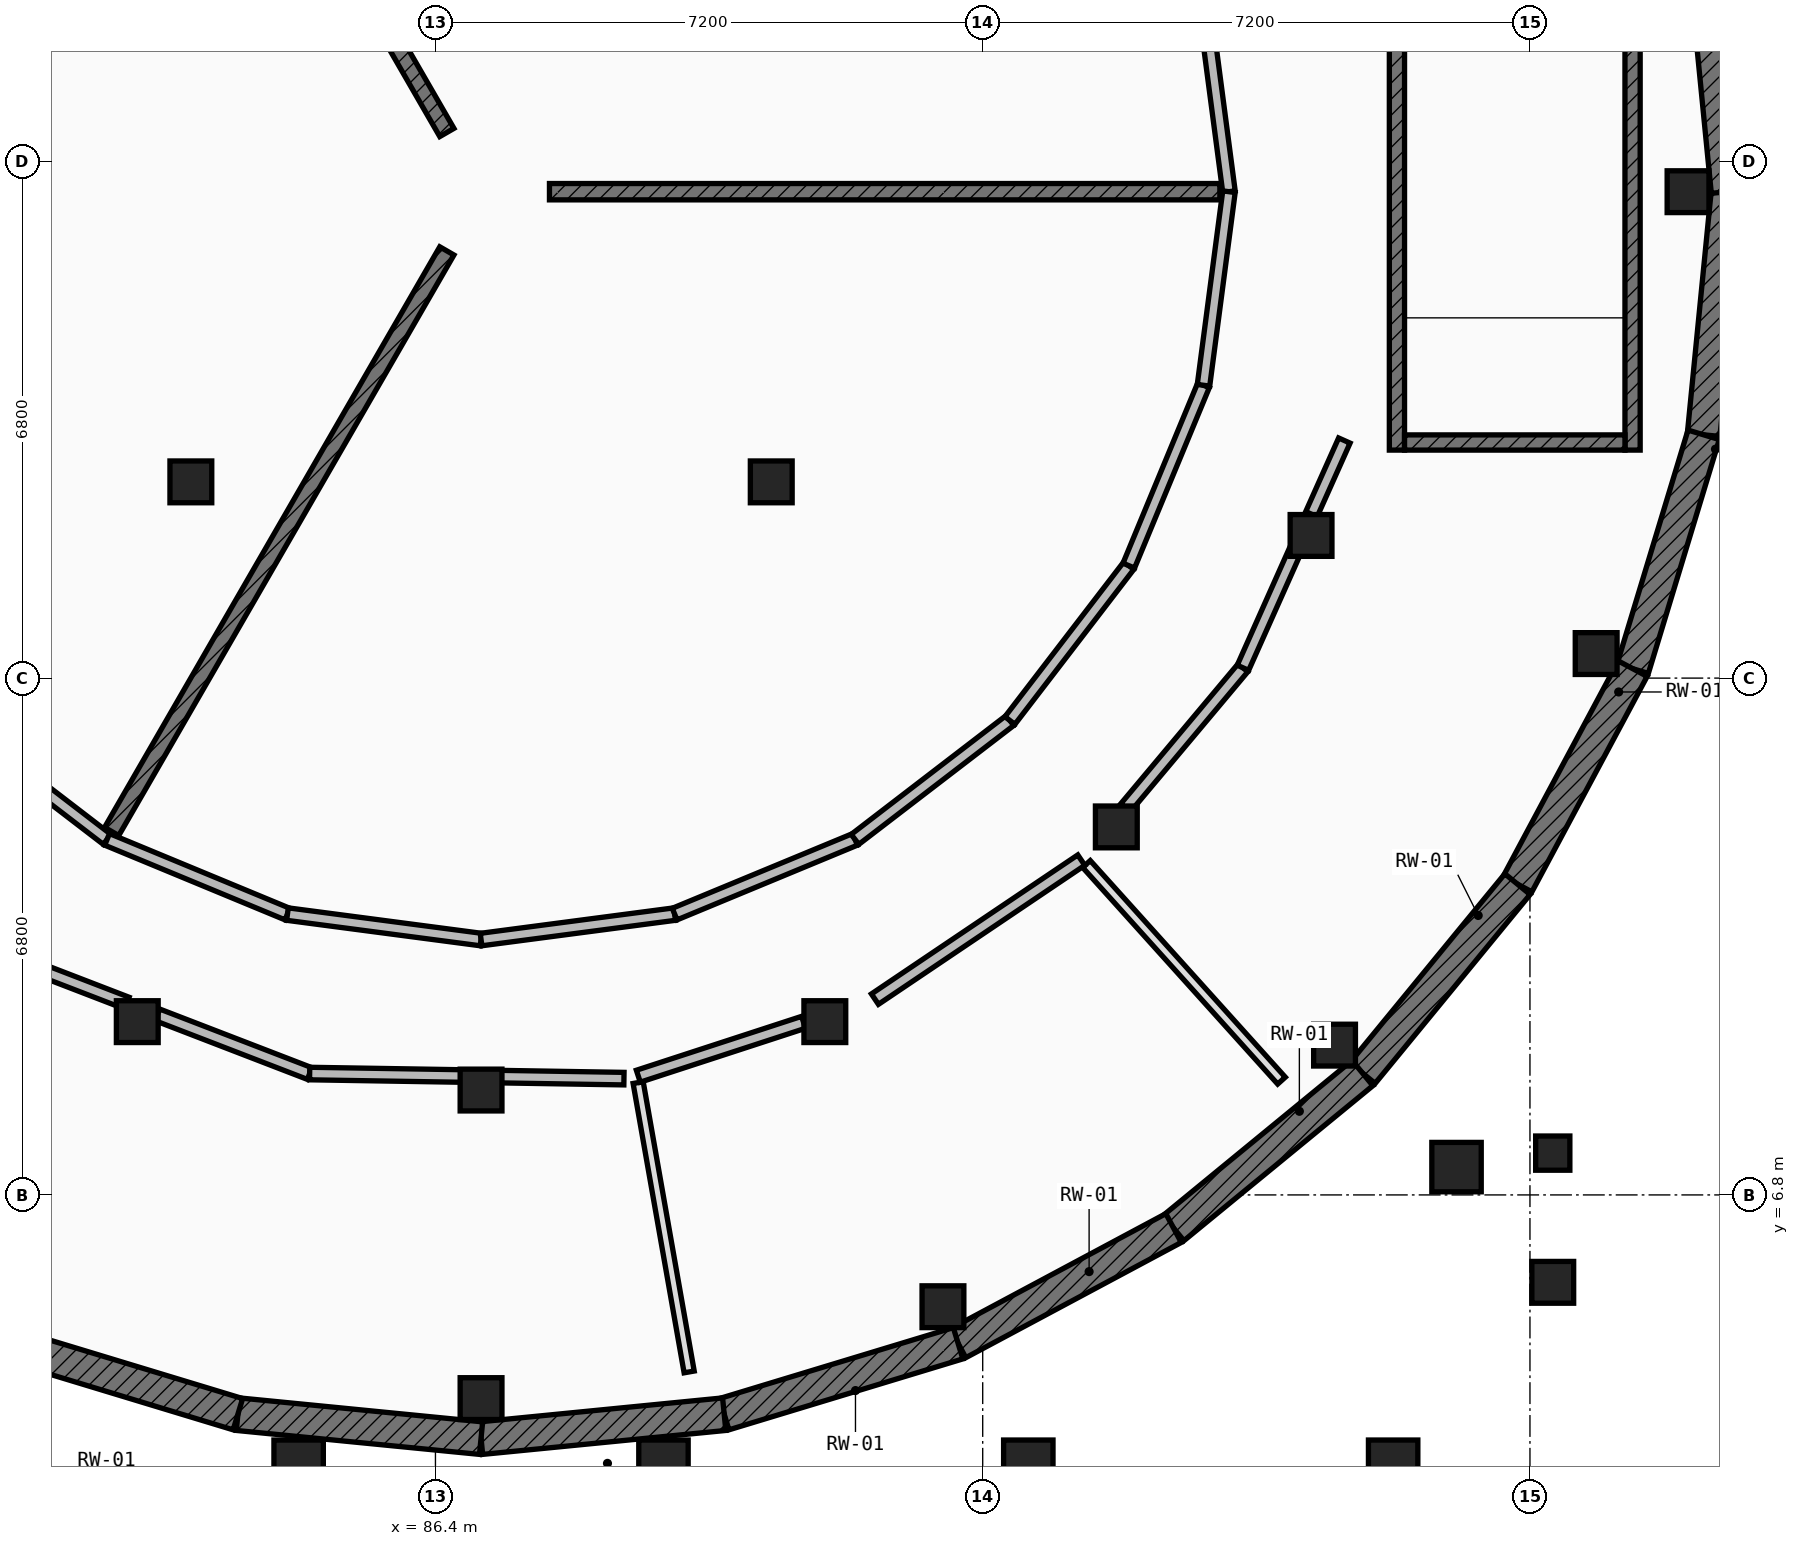
"""IFC4 building model, lengths in metres.
Left out: names, types, materials, properties, quantities, classifications, styles, units other than length and angle.
Written with IfcOpenShell. Run it as: python <this file> out.ifc"""

import sys

from ifc_helpers import new_model, si_unit, direction, frame, frame_2d, origin, origin_2d, place, context, subcontext, project, spatial, rectangle, extrude, element, fill, save


model = new_model("IFC4")
c1 = context("Model", 3, precision=1e-05, world=origin(), true_north=direction((0.0, 1.0)))
c2 = subcontext(c1, "Body", "Model", "MODEL_VIEW")
j1 = project(units=[si_unit("LENGTHUNIT", "METRE"), si_unit("PLANEANGLEUNIT", "RADIAN")], contexts=[c1])
p1 = place(None, origin())
s1 = spatial("IfcSite", under=j1, at=p1, CompositionType="ELEMENT")
p2 = place(p1, origin())
s2 = spatial("IfcBuilding", under=s1, at=p2, CompositionType="ELEMENT")
p3 = place(p2, frame((0.0, 0.0, -4.55)))
s3 = spatial("IfcBuildingStorey", under=s2, at=p3, CompositionType="ELEMENT", Elevation=-4.55)
for number, where, z_axis, x_axis in (
    (1, (102.88, 20.0, 0.0), (0.0, 0.0, 1.0), (1.0, 0.0, 0.0)),
    (2, (87.0, 4.12, 0.0), (0.0, 0.0, 1.0), (1.0, 0.0, 0.0)),
    (3, (93.077, 5.329, 0.0), (0.0, 0.0, 1.0), (1.0, 0.0, 0.0)),
    (4, (98.229, 8.771, 0.0), (0.0, 0.0, 1.0), (1.0, 0.0, 0.0)),
    (5, (101.671, 13.923, 0.0), (0.0, 0.0, 1.0), (1.0, 0.0, 0.0)),
    (6, (82.477, 9.08, 0.0), (0.0, 0.0, 1.0), (1.0, 0.0, 0.0)),
    (7, (87.0, 8.18, 0.0), (0.0, 0.0, 1.0), (1.0, 0.0, 0.0)),
    (8, (91.523, 9.08, 0.0), (0.0, 0.0, 1.0), (1.0, 0.0, 0.0)),
    (9, (95.358, 11.642, 0.0), (0.0, 0.0, 1.0), (1.0, 0.0, 0.0)),
    (10, (97.92, 15.477, 0.0), (0.0, 0.0, 1.0), (1.0, 0.0, 0.0)),
    (11, (83.182, 16.182, 0.0), (0.0, 0.0, 1.0), (1.0, 0.0, 0.0)),
    (12, (90.818, 16.182, 0.0), (0.0, 0.0, 1.0), (1.0, 0.0, 0.0)),
):
    element("IfcColumn", number, at=place(p3, frame(where, z_axis=z_axis, x_axis=x_axis)), inside=s3, PredefinedType="COLUMN", context=c2, shape_type="SweptSolid", body=[
        extrude(rectangle(XDim=0.55, YDim=0.55, at=origin_2d()), origin(), (0.0, 0.0, 1.0), 4.55),
    ])
for number, where, z_axis, x_axis in (
    (13, (84.6, 3.25, 0.0), (0.0, 0.0, 1.0), (1.0, 0.0, 0.0)),
    (14, (89.4, 3.25, 0.0), (0.0, 0.0, 1.0), (1.0, 0.0, 0.0)),
    (15, (94.2, 3.25, 0.0), (0.0, 0.0, 1.0), (1.0, 0.0, 0.0)),
    (16, (99.0, 3.25, 0.0), (0.0, 0.0, 1.0), (1.0, 0.0, 0.0)),
):
    element("IfcColumn", number, at=place(p3, frame(where, z_axis=z_axis, x_axis=x_axis)), inside=s3, PredefinedType="COLUMN", context=c2, shape_type="SweptSolid", body=[
        extrude(rectangle(XDim=0.65, YDim=0.65, at=origin_2d()), origin(), (0.0, 0.0, 1.0), 4.55),
    ])
p4 = place(p3, frame((101.1, 5.65, 0.0), z_axis=(0.0, 0.0, 1.0), x_axis=(1.0, 0.0, 0.0)))
e17 = element("IfcColumn", 17, at=p4, inside=s3, PredefinedType="COLUMN", context=c2, shape_type="SweptSolid", body=[
    extrude(rectangle(XDim=0.55, YDim=0.55, at=origin_2d()), origin(), (0.0, 0.0, 1.0), 4.55),
])
p5 = place(p3, frame((99.834, 7.166, 0.0), z_axis=(0.0, 0.0, 1.0), x_axis=(1.0, 0.0, 0.0)))
e18 = element("IfcColumn", 18, at=p5, inside=s3, PredefinedType="COLUMN", context=c2, shape_type="SweptSolid", body=[
    extrude(rectangle(XDim=0.65, YDim=0.65, at=origin_2d()), origin(), (0.0, 0.0, 1.0), 4.55),
])
p6 = place(p3, frame((101.1, 7.35, 0.0), z_axis=(0.0, 0.0, 1.0), x_axis=(1.0, 0.0, 0.0)))
e19 = element("IfcColumn", 19, at=p6, inside=s3, PredefinedType="COLUMN", context=c2, shape_type="SweptSolid", body=[
    extrude(rectangle(XDim=0.45, YDim=0.45, at=origin_2d()), origin(), (0.0, 0.0, 1.0), 4.55),
])
p7 = place(p3, frame((103.4, 20.0, 0.0), z_axis=(0.0, 0.0, 1.0), x_axis=(-0.097977057849, -0.995188673637, 0.0)))
e20 = element("IfcWall", 20, at=p7, inside=s3, PredefinedType="USERDEFINED", context=c2, shape_type="SweptSolid", body=[
    extrude(rectangle(XDim=3.214, YDim=0.43, at=frame_2d((1.607, 0.0))), origin(), (0.0, 0.0, 1.0), 3.335),
])
for number, where, z_axis, x_axis in (
    (21, (103.085, 16.801, 0.0), (0.0, 0.0, 1.0), (-0.29, -0.957, 0.0)),
    (22, (102.152, 13.724, 0.0), (0.0, 0.0, 1.0), (-0.472, -0.882, 0.0)),
    (23, (100.636, 10.889, 0.0), (0.0, 0.0, 1.0), (-0.634, -0.773, 0.0)),
    (24, (98.597, 8.403, 0.0), (0.0, 0.0, 1.0), (-0.773, -0.634, 0.0)),
    (25, (96.111, 6.364, 0.0), (0.0, 0.0, 1.0), (-0.882, -0.472, 0.0)),
    (26, (93.276, 4.848, 0.0), (0.0, 0.0, 1.0), (-0.957, -0.29, 0.0)),
):
    element("IfcWall", number, at=place(p3, frame(where, z_axis=z_axis, x_axis=x_axis)), inside=s3, PredefinedType="USERDEFINED", context=c2, shape_type="SweptSolid", body=[
        extrude(rectangle(XDim=3.215, YDim=0.43, at=frame_2d((1.607, 0.0))), origin(), (0.0, 0.0, 1.0), 3.335),
    ])
for number, where, z_axis, x_axis in (
    (27, (90.199, 3.915, 0.0), (0.0, 0.0, 1.0), (-0.995, -0.098, 0.0)),
    (28, (87.0, 3.6, 0.0), (0.0, 0.0, 1.0), (-0.995, 0.098, 0.0)),
):
    element("IfcWall", number, at=place(p3, frame(where, z_axis=z_axis, x_axis=x_axis)), inside=s3, PredefinedType="USERDEFINED", context=c2, shape_type="SweptSolid", body=[
        extrude(rectangle(XDim=3.214, YDim=0.43, at=frame_2d((1.607, 0.0))), origin(), (0.0, 0.0, 1.0), 3.335),
    ])
p8 = place(p3, frame((83.801, 3.915, 0.0), z_axis=(0.0, 0.0, 1.0), x_axis=(-0.956984161567, 0.29014016356, 0.0)))
e29 = element("IfcWall", 29, at=p8, inside=s3, PredefinedType="USERDEFINED", context=c2, shape_type="SweptSolid", body=[
    extrude(rectangle(XDim=3.215, YDim=0.43, at=frame_2d((1.607, 0.0))), origin(), (0.0, 0.0, 1.0), 3.335),
])
p9 = place(p3, frame((103.085, 23.199, 0.0), z_axis=(0.0, 0.0, 1.0), x_axis=(0.097977057849, -0.995188673637, 0.0)))
e30 = element("IfcWall", 30, at=p9, inside=s3, PredefinedType="USERDEFINED", context=c2, shape_type="SweptSolid", body=[
    extrude(rectangle(XDim=3.214, YDim=0.43, at=frame_2d((1.607, 0.0))), origin(), (0.0, 0.0, 1.0), 3.335),
])
p10 = place(p3, frame((99.05, 23.4, 0.0), z_axis=(0.0, 0.0, 1.0), x_axis=(0.0, -1.0, 0.0)))
e31 = element("IfcWall", 31, at=p10, inside=s3, PredefinedType="SHEAR", context=c2, shape_type="SweptSolid", body=[
    extrude(rectangle(XDim=6.8, YDim=0.2, at=frame_2d((3.4, 0.0))), origin(), (0.0, 0.0, 1.0), 4.135),
])
p11 = place(p10, frame((0.38, 0.0, 0.0)))
e32 = element("IfcOpeningElement", 32, at=p11, cuts=e31, PredefinedType="OPENING", context=c2, shape_type="SweptSolid", body=[
    extrude(rectangle(XDim=1.05, YDim=2.15, at=frame_2d((0.525, 1.075))), frame((0.0, 0.11, 0.0), z_axis=(0.0, -1.0, 0.0), x_axis=(1.0, 0.0, 0.0)), (0.0, 0.0, 1.0), 0.22),
])
p12 = place(p3, frame((102.15, 23.4, 0.0), z_axis=(0.0, 0.0, 1.0), x_axis=(0.0, -1.0, 0.0)))
e33 = element("IfcWall", 33, at=p12, inside=s3, PredefinedType="SHEAR", context=c2, shape_type="SweptSolid", body=[
    extrude(rectangle(XDim=6.8, YDim=0.2, at=frame_2d((3.4, 0.0))), origin(), (0.0, 0.0, 1.0), 4.135),
])
p13 = place(p3, frame((99.15, 16.7, 0.0), z_axis=(0.0, 0.0, 1.0), x_axis=(1.0, 0.0, 0.0)))
e34 = element("IfcWall", 34, at=p13, inside=s3, PredefinedType="SHEAR", context=c2, shape_type="SweptSolid", body=[
    extrude(rectangle(XDim=2.9, YDim=0.2, at=frame_2d((1.45, 0.0))), origin(), (0.0, 0.0, 1.0), 4.135),
])
p14 = place(p3, frame((87.9, 20.0, 0.0), z_axis=(0.0, 0.0, 1.0), x_axis=(1.0, 0.0, 0.0)))
e35 = element("IfcWall", 35, at=p14, inside=s3, PredefinedType="SOLIDWALL", context=c2, shape_type="SweptSolid", body=[
    extrude(rectangle(XDim=8.82, YDim=0.215, at=frame_2d((4.41, 0.0))), origin(), (0.0, 0.0, 1.0), 2.76),
])
for number, where, z_axis, x_axis in (
    (36, (86.55, 20.779, 0.0), (0.0, 0.0, 1.0), (-0.5, 0.866, 0.0)),
    (37, (86.55, 19.221, 0.0), (0.0, 0.0, 1.0), (-0.5, -0.866, 0.0)),
):
    element("IfcWall", number, at=place(p3, frame(where, z_axis=z_axis, x_axis=x_axis)), inside=s3, PredefinedType="SOLIDWALL", context=c2, shape_type="SweptSolid", body=[
        extrude(rectangle(XDim=8.821, YDim=0.215, at=frame_2d((4.41, 0.0))), origin(), (0.0, 0.0, 1.0), 2.76),
    ])
for number, where, z_axis, x_axis in (
    (38, (96.84, 20.0, 0.0), (0.0, 0.0, 1.0), (-0.13, 0.991, 0.0)),
    (39, (80.042, 13.042, 0.0), (0.0, 0.0, 1.0), (0.793, -0.609, 0.0)),
):
    element("IfcWall", number, at=place(p3, frame(where, z_axis=z_axis, x_axis=x_axis)), inside=s3, PredefinedType="PARTITIONING", context=c2, shape_type="SweptSolid", body=[
        extrude(rectangle(XDim=2.569, YDim=0.165, at=frame_2d((1.285, 0.0))), origin(), (0.0, 0.0, 1.0), 2.76),
    ])
p15 = place(p3, frame((82.08, 11.478, 0.0), z_axis=(0.0, 0.0, 1.0), x_axis=(0.923870848353, -0.382704397106, 0.0)))
e40 = element("IfcWall", 40, at=p15, inside=s3, PredefinedType="PARTITIONING", context=c2, shape_type="SweptSolid", body=[
    extrude(rectangle(XDim=2.568, YDim=0.165, at=frame_2d((1.284, 0.0))), origin(), (0.0, 0.0, 1.0), 2.76),
])
for number, where, z_axis, x_axis in (
    (41, (84.453, 10.495, 0.0), (0.0, 0.0, 1.0), (0.991, -0.13, 0.0)),
    (42, (87.0, 10.16, 0.0), (0.0, 0.0, 1.0), (0.991, 0.13, 0.0)),
):
    element("IfcWall", number, at=place(p3, frame(where, z_axis=z_axis, x_axis=x_axis)), inside=s3, PredefinedType="PARTITIONING", context=c2, shape_type="SweptSolid", body=[
        extrude(rectangle(XDim=2.569, YDim=0.165, at=frame_2d((1.285, 0.0))), origin(), (0.0, 0.0, 1.0), 2.76),
    ])
p16 = place(p3, frame((89.547, 10.495, 0.0), z_axis=(0.0, 0.0, 1.0), x_axis=(0.923870848353, 0.382704397106, 0.0)))
e43 = element("IfcWall", 43, at=p16, inside=s3, PredefinedType="PARTITIONING", context=c2, shape_type="SweptSolid", body=[
    extrude(rectangle(XDim=2.568, YDim=0.165, at=frame_2d((1.284, 0.0))), origin(), (0.0, 0.0, 1.0), 2.76),
])
p17 = place(p16, frame((0.624, 0.0, 0.0)))
e44 = element("IfcOpeningElement", 44, at=p17, cuts=e43, PredefinedType="OPENING", context=c2, shape_type="SweptSolid", body=[
    extrude(rectangle(XDim=1.32, YDim=2.24, at=frame_2d((0.66, 1.12))), frame((0.0, 0.093, 0.0), z_axis=(0.0, -1.0, 0.0), x_axis=(1.0, 0.0, 0.0)), (0.0, 0.0, 1.0), 0.185),
])
for number, where, z_axis, x_axis in (
    (45, (91.92, 11.478, 0.0), (0.0, 0.0, 1.0), (0.793, 0.609, 0.0)),
    (46, (93.958, 13.042, 0.0), (0.0, 0.0, 1.0), (0.609, 0.793, 0.0)),
):
    element("IfcWall", number, at=place(p3, frame(where, z_axis=z_axis, x_axis=x_axis)), inside=s3, PredefinedType="PARTITIONING", context=c2, shape_type="SweptSolid", body=[
        extrude(rectangle(XDim=2.569, YDim=0.165, at=frame_2d((1.285, 0.0))), origin(), (0.0, 0.0, 1.0), 2.76),
    ])
p18 = place(p3, frame((95.522, 15.08, 0.0), z_axis=(0.0, 0.0, 1.0), x_axis=(0.382704397106, 0.923870848353, 0.0)))
e47 = element("IfcWall", 47, at=p18, inside=s3, PredefinedType="PARTITIONING", context=c2, shape_type="SweptSolid", body=[
    extrude(rectangle(XDim=2.568, YDim=0.165, at=frame_2d((1.284, 0.0))), origin(), (0.0, 0.0, 1.0), 2.76),
])
p19 = place(p3, frame((96.505, 17.453, 0.0), z_axis=(0.0, 0.0, 1.0), x_axis=(0.130476636685, 0.991451384224, 0.0)))
e48 = element("IfcWall", 48, at=p19, inside=s3, PredefinedType="PARTITIONING", context=c2, shape_type="SweptSolid", body=[
    extrude(rectangle(XDim=2.569, YDim=0.165, at=frame_2d((1.285, 0.0))), origin(), (0.0, 0.0, 1.0), 2.76),
])
p20 = place(p3, frame((89.067, 8.278, 0.0), z_axis=(0.0, 0.0, 1.0), x_axis=(0.173608798187, -0.984814695865, 0.0)))
e49 = element("IfcWall", 49, at=p20, inside=s3, PredefinedType="PLUMBINGWALL", context=c2, shape_type="SweptSolid", body=[
    extrude(rectangle(XDim=3.866, YDim=0.135, at=frame_2d((1.933, 0.0))), origin(), (0.0, 0.0, 1.0), 2.76),
])
p21 = place(p3, frame((94.965, 11.154, 0.0), z_axis=(0.0, 0.0, 1.0), x_axis=(0.66908430845, -0.74318650969, 0.0)))
e50 = element("IfcWall", 50, at=p21, inside=s3, PredefinedType="PLUMBINGWALL", context=c2, shape_type="SweptSolid", body=[
    extrude(rectangle(XDim=3.835, YDim=0.135, at=frame_2d((1.917, 0.0))), origin(), (0.0, 0.0, 1.0), 2.76),
])
p22 = place(p3, frame((80.886, 9.884, 0.0), z_axis=(0.0, 0.0, 1.0), x_axis=(0.933175901825, -0.359419999796, 0.0)))
e51 = element("IfcWall", 51, at=p22, inside=s3, PredefinedType="PARTITIONING", context=c2, shape_type="SweptSolid", body=[
    extrude(rectangle(XDim=1.558, YDim=0.165, at=frame_2d((0.779, 0.0))), origin(), (0.0, 0.0, 1.0), 2.76),
])
p23 = place(p22, frame((0.304, 0.0, 0.0)))
e52 = element("IfcOpeningElement", 52, at=p23, cuts=e51, PredefinedType="OPENING", context=c2, shape_type="SweptSolid", body=[
    extrude(rectangle(XDim=0.95, YDim=2.16, at=frame_2d((0.475, 1.08))), frame((0.0, 0.093, 0.0), z_axis=(0.0, -1.0, 0.0), x_axis=(1.0, 0.0, 0.0)), (0.0, 0.0, 1.0), 0.185),
])
p24 = place(p3, frame((82.742, 9.169, 0.0), z_axis=(0.0, 0.0, 1.0), x_axis=(0.933107987924, -0.359596277613, 0.0)))
e53 = element("IfcWall", 53, at=p24, inside=s3, PredefinedType="PARTITIONING", context=c2, shape_type="SweptSolid", body=[
    extrude(rectangle(XDim=2.147, YDim=0.165, at=frame_2d((1.073, 0.0))), origin(), (0.0, 0.0, 1.0), 2.76),
])
p25 = place(p3, frame((84.745, 8.397, 0.0), z_axis=(0.0, 0.0, 1.0), x_axis=(0.999870014647, -0.016123083132, 0.0)))
e54 = element("IfcWall", 54, at=p25, inside=s3, PredefinedType="PARTITIONING", context=c2, shape_type="SweptSolid", body=[
    extrude(rectangle(XDim=2.044, YDim=0.165, at=frame_2d((1.022, 0.0))), origin(), (0.0, 0.0, 1.0), 2.76),
])
p26 = place(p3, frame((87.217, 8.357, 0.0), z_axis=(0.0, 0.0, 1.0), x_axis=(0.999869608685, -0.016148239165, 0.0)))
e55 = element("IfcWall", 55, at=p26, inside=s3, PredefinedType="PARTITIONING", context=c2, shape_type="SweptSolid", body=[
    extrude(rectangle(XDim=1.663, YDim=0.165, at=frame_2d((0.832, 0.0))), origin(), (0.0, 0.0, 1.0), 2.76),
])
p27 = place(p3, frame((89.069, 8.362, 0.0), z_axis=(0.0, 0.0, 1.0), x_axis=(0.950713418435, 0.310070953182, 0.0)))
e56 = element("IfcWall", 56, at=p27, inside=s3, PredefinedType="PARTITIONING", context=c2, shape_type="SweptSolid", body=[
    extrude(rectangle(XDim=2.287, YDim=0.165, at=frame_2d((1.143, 0.0))), origin(), (0.0, 0.0, 1.0), 2.76),
])
p28 = place(p27, frame((0.694, 0.0, 0.0)))
e57 = element("IfcOpeningElement", 57, at=p28, cuts=e56, PredefinedType="OPENING", context=c2, shape_type="SweptSolid", body=[
    extrude(rectangle(XDim=0.9, YDim=2.1, at=frame_2d((0.45, 1.05))), frame((0.0, 0.093, 0.0), z_axis=(0.0, -1.0, 0.0), x_axis=(1.0, 0.0, 0.0)), (0.0, 0.0, 1.0), 0.185),
])
p29 = place(p3, frame((92.182, 9.376, 0.0), z_axis=(0.0, 0.0, 1.0), x_axis=(0.829355825357, 0.558720784423, 0.0)))
e58 = element("IfcWall", 58, at=p29, inside=s3, PredefinedType="PARTITIONING", context=c2, shape_type="SweptSolid", body=[
    extrude(rectangle(XDim=3.274, YDim=0.165, at=frame_2d((1.637, 0.0))), origin(), (0.0, 0.0, 1.0), 2.76),
])
p30 = place(p3, frame((95.48, 11.894, 0.0), z_axis=(0.0, 0.0, 1.0), x_axis=(0.642369860946, 0.766394781916, 0.0)))
e59 = element("IfcWall", 59, at=p30, inside=s3, PredefinedType="PARTITIONING", context=c2, shape_type="SweptSolid", body=[
    extrude(rectangle(XDim=2.404, YDim=0.165, at=frame_2d((1.202, 0.0))), origin(), (0.0, 0.0, 1.0), 2.76),
])
p31 = place(p30, frame((0.732, 0.0, 0.0)))
e60 = element("IfcOpeningElement", 60, at=p31, cuts=e59, PredefinedType="OPENING", context=c2, shape_type="SweptSolid", body=[
    extrude(rectangle(XDim=0.94, YDim=2.1, at=frame_2d((0.47, 1.05))), frame((0.0, 0.093, 0.0), z_axis=(0.0, -1.0, 0.0), x_axis=(1.0, 0.0, 0.0)), (0.0, 0.0, 1.0), 0.185),
])
p32 = place(p3, frame((97.024, 13.736, 0.0), z_axis=(0.0, 0.0, 1.0), x_axis=(0.407299490474, 0.913294654019, 0.0)))
e61 = element("IfcWall", 61, at=p32, inside=s3, PredefinedType="PARTITIONING", context=c2, shape_type="SweptSolid", body=[
    extrude(rectangle(XDim=1.697, YDim=0.165, at=frame_2d((0.849, 0.0))), origin(), (0.0, 0.0, 1.0), 2.76),
])
p33 = place(p3, frame((97.925, 15.757, 0.0), z_axis=(0.0, 0.0, 1.0), x_axis=(0.407866620659, 0.913041521374, 0.0)))
e62 = element("IfcWall", 62, at=p33, inside=s3, PredefinedType="PARTITIONING", context=c2, shape_type="SweptSolid", body=[
    extrude(rectangle(XDim=1.061, YDim=0.165, at=frame_2d((0.531, 0.0))), origin(), (0.0, 0.0, 1.0), 2.76),
])
p34 = place(p17, origin())
e63 = element("IfcDoor", 63, at=p34, inside=s3, OperationType="SINGLE_SWING_LEFT", PredefinedType="DOOR", context=c2, shape_type="SweptSolid", body=[
    extrude(rectangle(XDim=1.32, YDim=2.24, at=frame_2d((0.66, 1.12))), frame((0.0, 0.025, 0.0), z_axis=(0.0, -1.0, 0.0), x_axis=(1.0, 0.0, 0.0)), (0.0, 0.0, 1.0), 0.05),
])
fill(e44, e63)
p35 = place(p23, origin())
e64 = element("IfcDoor", 64, at=p35, inside=s3, OperationType="SINGLE_SWING_LEFT", PredefinedType="DOOR", context=c2, shape_type="SweptSolid", body=[
    extrude(rectangle(XDim=0.95, YDim=2.16, at=frame_2d((0.475, 1.08))), frame((0.0, 0.025, 0.0), z_axis=(0.0, -1.0, 0.0), x_axis=(1.0, 0.0, 0.0)), (0.0, 0.0, 1.0), 0.05),
])
fill(e52, e64)
p36 = place(p28, origin())
e65 = element("IfcDoor", 65, at=p36, inside=s3, OperationType="SINGLE_SWING_RIGHT", PredefinedType="DOOR", context=c2, shape_type="SweptSolid", body=[
    extrude(rectangle(XDim=0.9, YDim=2.1, at=frame_2d((0.45, 1.05))), frame((0.0, 0.025, 0.0), z_axis=(0.0, -1.0, 0.0), x_axis=(1.0, 0.0, 0.0)), (0.0, 0.0, 1.0), 0.05),
])
fill(e57, e65)
p37 = place(p31, origin())
e66 = element("IfcDoor", 66, at=p37, inside=s3, OperationType="SINGLE_SWING_LEFT", PredefinedType="DOOR", context=c2, shape_type="SweptSolid", body=[
    extrude(rectangle(XDim=0.94, YDim=2.1, at=frame_2d((0.47, 1.05))), frame((0.0, 0.025, 0.0), z_axis=(0.0, -1.0, 0.0), x_axis=(1.0, 0.0, 0.0)), (0.0, 0.0, 1.0), 0.05),
])
fill(e60, e66)
save(model, sys.argv[1])
